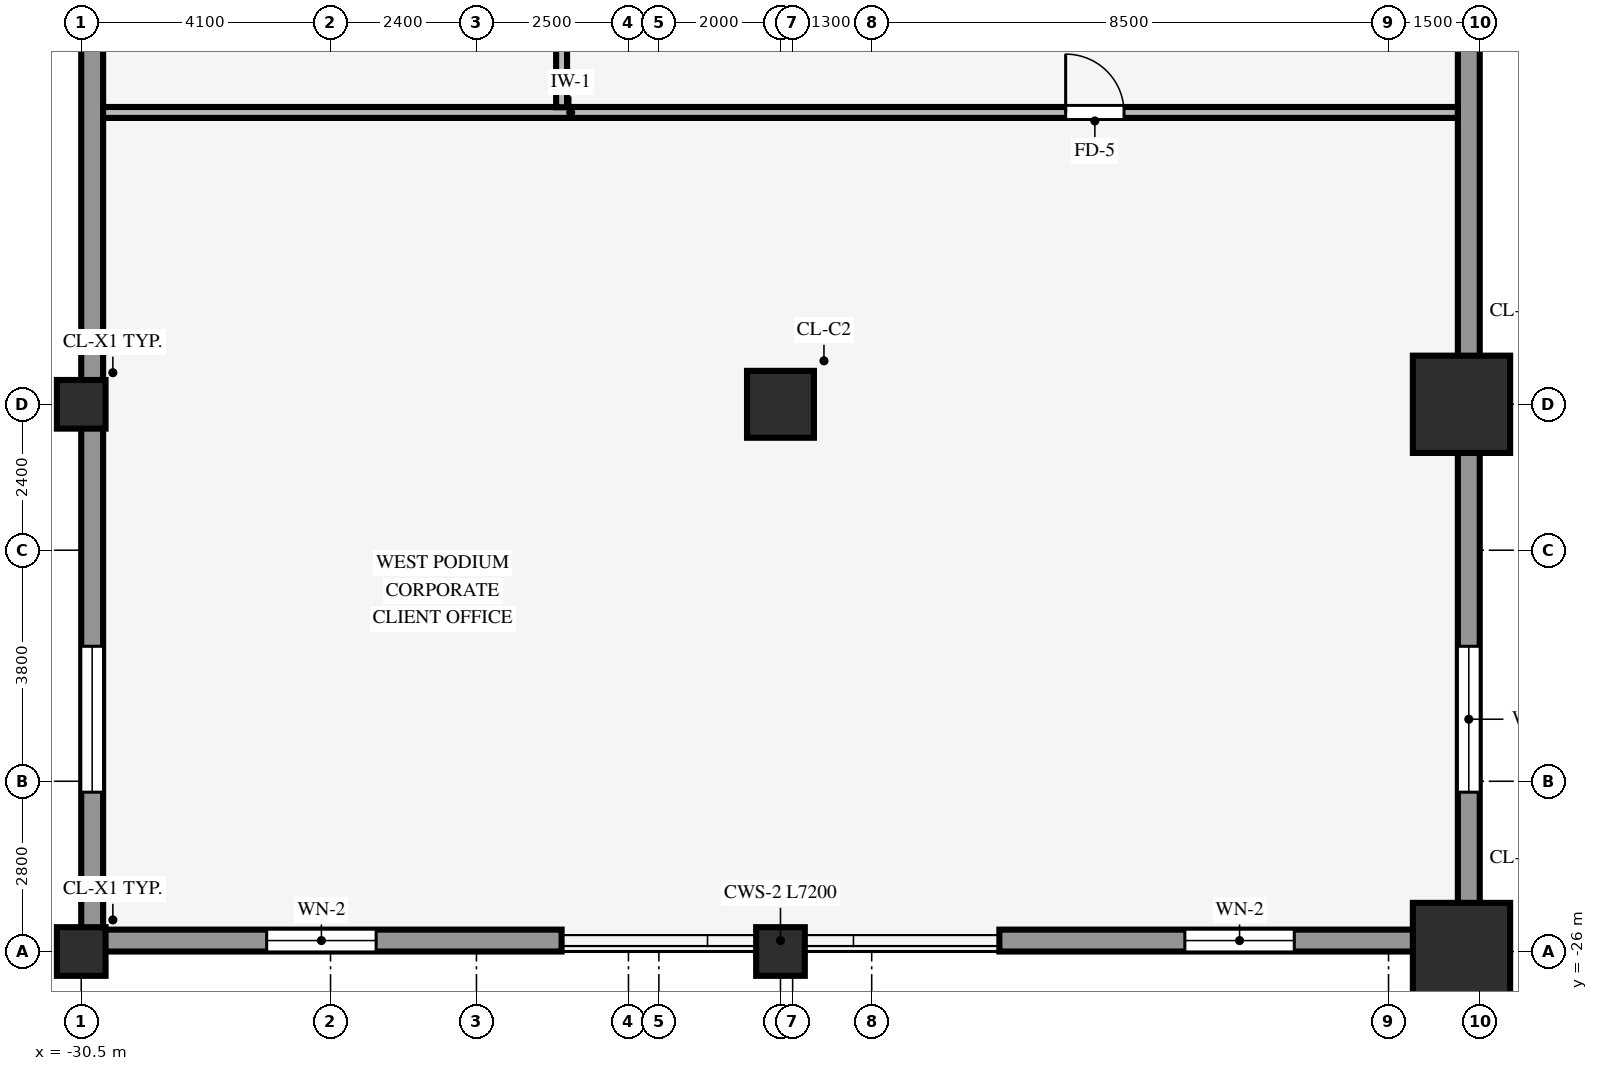
"""IFC4 building model, lengths in metres.
Left out: names, types, materials, properties, quantities, classifications, styles, units other than length and angle.
Written with IfcOpenShell. Run it as: python <this file> out.ifc"""

import sys

from ifc_helpers import new_model, si_unit, direction, frame, frame_2d, origin, origin_2d, place, context, subcontext, project, spatial, rectangle, hollow_rectangle, extrude, source, transform, mapped, element, fill, save


model = new_model("IFC4")
c1 = context("Model", 3, precision=1e-05, world=origin(), true_north=direction((0.0, 1.0)))
c2 = subcontext(c1, "Body", "Model", "MODEL_VIEW")
j1 = project(units=[si_unit("LENGTHUNIT", "METRE"), si_unit("PLANEANGLEUNIT", "RADIAN")], contexts=[c1])
p1 = place(None, origin())
s1 = spatial("IfcSite", under=j1, at=p1, CompositionType="ELEMENT")
p2 = place(p1, origin())
s2 = spatial("IfcBuilding", under=s1, at=p2, CompositionType="ELEMENT")
p3 = place(p2, frame((0.0, 0.0, 9.2)))
s3 = spatial("IfcBuildingStorey", under=s2, at=p3, CompositionType="ELEMENT", Elevation=9.2)
for number, where, z_axis, x_axis in (
    (1, (-7.8, -26.0, 0.0), (0.0, 0.0, 1.0), (1.0, 0.0, 0.0)),
    (2, (-7.8, -17.0, 0.0), (0.0, 0.0, 1.0), (1.0, 0.0, 0.0)),
):
    element("IfcColumn", number, at=place(p3, frame(where, z_axis=z_axis, x_axis=x_axis)), inside=s3, PredefinedType="COLUMN", context=c2, shape_type="SweptSolid", body=[
        extrude(rectangle(XDim=1.6, YDim=1.6, at=origin_2d()), origin(), (0.0, 0.0, 1.0), 4.28),
    ])
for number, where, z_axis, x_axis in (
    (3, (-30.5, -26.0, 0.0), (0.0, 0.0, 1.0), (1.0, 0.0, 0.0)),
    (4, (-30.5, -17.0, 0.0), (0.0, 0.0, 1.0), (1.0, 0.0, 0.0)),
    (5, (-19.0, -26.0, 0.0), (0.0, 0.0, 1.0), (1.0, 0.0, 0.0)),
):
    element("IfcColumn", number, at=place(p3, frame(where, z_axis=z_axis, x_axis=x_axis)), inside=s3, PredefinedType="COLUMN", context=c2, shape_type="SweptSolid", body=[
        extrude(hollow_rectangle(XDim=0.8, YDim=0.8, WallThickness=0.055, InnerFilletRadius=0.055, OuterFilletRadius=0.11, at=origin_2d()), origin(), (0.0, 0.0, 1.0), 4.28),
    ])
p4 = place(p3, frame((-19.0, -17.0, 0.0), z_axis=(0.0, 0.0, 1.0), x_axis=(1.0, 0.0, 0.0)))
e6 = element("IfcColumn", 6, at=p4, inside=s3, PredefinedType="COLUMN", context=c2, shape_type="SweptSolid", body=[
    extrude(rectangle(XDim=1.1, YDim=1.1, at=origin_2d()), origin(), (0.0, 0.0, 1.0), 4.28),
])
p5 = place(p3, frame((-30.5, -25.82, 0.0), z_axis=(0.0, 0.0, 1.0), x_axis=(1.0, 0.0, 0.0)))
e7 = element("IfcWall", 7, at=p5, inside=s3, PredefinedType="STANDARD", context=c2, shape_type="SweptSolid", body=[
    extrude(rectangle(XDim=7.9, YDim=0.36, at=frame_2d((3.95, 0.0))), origin(), (0.0, 0.0, 1.0), 3.615),
])
p6 = place(p5, frame((3.05, 0.0, 0.85)))
e8 = element("IfcOpeningElement", 8, at=p6, cuts=e7, PredefinedType="OPENING", context=c2, shape_type="SweptSolid", body=[
    extrude(rectangle(XDim=1.8, YDim=2.35, at=frame_2d((0.9, 1.175))), frame((0.0, 0.19, 0.0), z_axis=(0.0, -1.0, 0.0), x_axis=(1.0, 0.0, 0.0)), (0.0, 0.0, 1.0), 0.38),
])
p7 = place(p3, frame((-15.4, -25.82, 0.0), z_axis=(0.0, 0.0, 1.0), x_axis=(1.0, 0.0, 0.0)))
e9 = element("IfcWall", 9, at=p7, inside=s3, PredefinedType="STANDARD", context=c2, shape_type="SweptSolid", body=[
    extrude(rectangle(XDim=7.9, YDim=0.36, at=frame_2d((3.95, 0.0))), origin(), (0.0, 0.0, 1.0), 3.615),
])
p8 = place(p7, frame((3.05, 0.0, 0.85)))
e10 = element("IfcOpeningElement", 10, at=p8, cuts=e9, PredefinedType="OPENING", context=c2, shape_type="SweptSolid", body=[
    extrude(rectangle(XDim=1.8, YDim=2.35, at=frame_2d((0.9, 1.175))), frame((0.0, 0.19, 0.0), z_axis=(0.0, -1.0, 0.0), x_axis=(1.0, 0.0, 0.0)), (0.0, 0.0, 1.0), 0.38),
])
p9 = place(p3, frame((-7.68, -25.644, 0.0), z_axis=(0.0, 0.0, 1.0), x_axis=(0.0, 1.0, 0.0)))
e11 = element("IfcWall", 11, at=p9, inside=s3, PredefinedType="STANDARD", context=c2, shape_type="SweptSolid", body=[
    extrude(rectangle(XDim=51.288, YDim=0.36, at=frame_2d((25.644, 0.0))), origin(), (0.0, 0.0, 1.0), 3.649),
])
p10 = place(p9, frame((2.264, 0.0, 0.85)))
e12 = element("IfcOpeningElement", 12, at=p10, cuts=e11, PredefinedType="OPENING", context=c2, shape_type="SweptSolid", body=[
    extrude(rectangle(XDim=2.4, YDim=2.45, at=frame_2d((1.2, 1.225))), frame((0.0, 0.19, 0.0), z_axis=(0.0, -1.0, 0.0), x_axis=(1.0, 0.0, 0.0)), (0.0, 0.0, 1.0), 0.38),
])
p11 = place(p9, frame((17.051, 0.0, 0.85)))
e13 = element("IfcOpeningElement", 13, at=p11, cuts=e11, PredefinedType="OPENING", context=c2, shape_type="SweptSolid", body=[
    extrude(rectangle(XDim=2.4, YDim=2.45, at=frame_2d((1.2, 1.225))), frame((0.0, 0.19, 0.0), z_axis=(0.0, -1.0, 0.0), x_axis=(1.0, 0.0, 0.0)), (0.0, 0.0, 1.0), 0.38),
])
p12 = place(p9, frame((21.979, 0.0, 0.85)))
e14 = element("IfcOpeningElement", 14, at=p12, cuts=e11, PredefinedType="OPENING", context=c2, shape_type="SweptSolid", body=[
    extrude(rectangle(XDim=2.4, YDim=2.45, at=frame_2d((1.2, 1.225))), frame((0.0, 0.19, 0.0), z_axis=(0.0, -1.0, 0.0), x_axis=(1.0, 0.0, 0.0)), (0.0, 0.0, 1.0), 0.38),
])
p13 = place(p9, frame((26.908, 0.0, 0.85)))
e15 = element("IfcOpeningElement", 15, at=p13, cuts=e11, PredefinedType="OPENING", context=c2, shape_type="SweptSolid", body=[
    extrude(rectangle(XDim=2.4, YDim=2.45, at=frame_2d((1.2, 1.225))), frame((0.0, 0.19, 0.0), z_axis=(0.0, -1.0, 0.0), x_axis=(1.0, 0.0, 0.0)), (0.0, 0.0, 1.0), 0.38),
])
p14 = place(p9, frame((31.837, 0.0, 0.85)))
e16 = element("IfcOpeningElement", 16, at=p14, cuts=e11, PredefinedType="OPENING", context=c2, shape_type="SweptSolid", body=[
    extrude(rectangle(XDim=2.4, YDim=2.45, at=frame_2d((1.2, 1.225))), frame((0.0, 0.19, 0.0), z_axis=(0.0, -1.0, 0.0), x_axis=(1.0, 0.0, 0.0)), (0.0, 0.0, 1.0), 0.38),
])
p15 = place(p9, frame((46.624, 0.0, 0.85)))
e17 = element("IfcOpeningElement", 17, at=p15, cuts=e11, PredefinedType="OPENING", context=c2, shape_type="SweptSolid", body=[
    extrude(rectangle(XDim=2.4, YDim=2.45, at=frame_2d((1.2, 1.225))), frame((0.0, 0.19, 0.0), z_axis=(0.0, -1.0, 0.0), x_axis=(1.0, 0.0, 0.0)), (0.0, 0.0, 1.0), 0.38),
])
p16 = place(p3, frame((-30.32, -25.644, 0.0), z_axis=(0.0, 0.0, 1.0), x_axis=(0.0, 1.0, 0.0)))
e18 = element("IfcWall", 18, at=p16, inside=s3, PredefinedType="STANDARD", context=c2, shape_type="SweptSolid", body=[
    extrude(rectangle(XDim=51.288, YDim=0.36, at=frame_2d((25.644, 0.0))), origin(), (0.0, 0.0, 1.0), 3.615),
])
p17 = place(p16, frame((2.264, 0.0, 0.85)))
e19 = element("IfcOpeningElement", 19, at=p17, cuts=e18, PredefinedType="OPENING", context=c2, shape_type="SweptSolid", body=[
    extrude(rectangle(XDim=2.4, YDim=2.45, at=frame_2d((1.2, 1.225))), frame((0.0, 0.19, 0.0), z_axis=(0.0, -1.0, 0.0), x_axis=(1.0, 0.0, 0.0)), (0.0, 0.0, 1.0), 0.38),
])
p18 = place(p16, frame((17.051, 0.0, 0.85)))
e20 = element("IfcOpeningElement", 20, at=p18, cuts=e18, PredefinedType="OPENING", context=c2, shape_type="SweptSolid", body=[
    extrude(rectangle(XDim=2.4, YDim=2.45, at=frame_2d((1.2, 1.225))), frame((0.0, 0.19, 0.0), z_axis=(0.0, -1.0, 0.0), x_axis=(1.0, 0.0, 0.0)), (0.0, 0.0, 1.0), 0.38),
])
p19 = place(p16, frame((21.979, 0.0, 0.85)))
e21 = element("IfcOpeningElement", 21, at=p19, cuts=e18, PredefinedType="OPENING", context=c2, shape_type="SweptSolid", body=[
    extrude(rectangle(XDim=2.4, YDim=2.45, at=frame_2d((1.2, 1.225))), frame((0.0, 0.19, 0.0), z_axis=(0.0, -1.0, 0.0), x_axis=(1.0, 0.0, 0.0)), (0.0, 0.0, 1.0), 0.38),
])
p20 = place(p16, frame((26.908, 0.0, 0.85)))
e22 = element("IfcOpeningElement", 22, at=p20, cuts=e18, PredefinedType="OPENING", context=c2, shape_type="SweptSolid", body=[
    extrude(rectangle(XDim=2.4, YDim=2.45, at=frame_2d((1.2, 1.225))), frame((0.0, 0.19, 0.0), z_axis=(0.0, -1.0, 0.0), x_axis=(1.0, 0.0, 0.0)), (0.0, 0.0, 1.0), 0.38),
])
p21 = place(p16, frame((31.837, 0.0, 0.85)))
e23 = element("IfcOpeningElement", 23, at=p21, cuts=e18, PredefinedType="OPENING", context=c2, shape_type="SweptSolid", body=[
    extrude(rectangle(XDim=2.4, YDim=2.45, at=frame_2d((1.2, 1.225))), frame((0.0, 0.19, 0.0), z_axis=(0.0, -1.0, 0.0), x_axis=(1.0, 0.0, 0.0)), (0.0, 0.0, 1.0), 0.38),
])
p22 = place(p16, frame((46.624, 0.0, 0.85)))
e24 = element("IfcOpeningElement", 24, at=p22, cuts=e18, PredefinedType="OPENING", context=c2, shape_type="SweptSolid", body=[
    extrude(rectangle(XDim=2.4, YDim=2.45, at=frame_2d((1.2, 1.225))), frame((0.0, 0.19, 0.0), z_axis=(0.0, -1.0, 0.0), x_axis=(1.0, 0.0, 0.0)), (0.0, 0.0, 1.0), 0.38),
])
p23 = place(p3, frame((-30.14, -12.2, 0.0), z_axis=(0.0, 0.0, 1.0), x_axis=(1.0, 0.0, 0.0)))
e25 = element("IfcWall", 25, at=p23, inside=s3, PredefinedType="PARTITIONING", context=c2, shape_type="SweptSolid", body=[
    extrude(rectangle(XDim=22.28, YDim=0.18, at=frame_2d((11.14, 0.0))), origin(), (0.0, 0.0, 1.0), 4.27),
])
p24 = place(p23, frame((15.83, 0.0, 0.0)))
e26 = element("IfcOpeningElement", 26, at=p24, cuts=e25, PredefinedType="OPENING", context=c2, shape_type="SweptSolid", body=[
    extrude(rectangle(XDim=0.96, YDim=2.1, at=frame_2d((0.48, 1.05))), frame((0.0, 0.1, 0.0), z_axis=(0.0, -1.0, 0.0), x_axis=(1.0, 0.0, 0.0)), (0.0, 0.0, 1.0), 0.2),
])
p25 = place(p3, frame((-22.6, -12.114, 0.0), z_axis=(0.0, 0.0, 1.0), x_axis=(0.0, 1.0, 0.0)))
e27 = element("IfcWall", 27, at=p25, inside=s3, PredefinedType="PARTITIONING", context=c2, shape_type="SweptSolid", body=[
    extrude(rectangle(XDim=37.919, YDim=0.18, at=frame_2d((18.959, 0.0))), origin(), (0.0, 0.0, 1.0), 4.27),
])
p26 = place(p25, frame((11.634, 0.0, 0.0)))
e28 = element("IfcOpeningElement", 28, at=p26, cuts=e27, PredefinedType="OPENING", context=c2, shape_type="SweptSolid", body=[
    extrude(rectangle(XDim=0.96, YDim=2.1, at=frame_2d((0.48, 1.05))), frame((0.0, 0.1, 0.0), z_axis=(0.0, -1.0, 0.0), x_axis=(1.0, 0.0, 0.0)), (0.0, 0.0, 1.0), 0.2),
])
p27 = place(p25, frame((29.534, 0.0, 0.0)))
e29 = element("IfcOpeningElement", 29, at=p27, cuts=e27, PredefinedType="OPENING", context=c2, shape_type="SweptSolid", body=[
    extrude(rectangle(XDim=0.96, YDim=2.1, at=frame_2d((0.48, 1.05))), frame((0.0, 0.1, 0.0), z_axis=(0.0, -1.0, 0.0), x_axis=(1.0, 0.0, 0.0)), (0.0, 0.0, 1.0), 0.2),
])
m1 = source(origin(), c2, "Body", "SweptSolid", [
    extrude(rectangle(XDim=1.8, YDim=2.35, at=frame_2d((0.9, 1.175))), frame((0.0, 0.03, 0.0), z_axis=(0.0, -1.0, 0.0), x_axis=(1.0, 0.0, 0.0)), (0.0, 0.0, 1.0), 0.06),
])
p28 = place(p6, origin())
e30 = element("IfcWindow", 30, at=p28, inside=s3, PartitioningType="SINGLE_PANEL", PredefinedType="WINDOW", context=c2, shape_type="MappedRepresentation", body=[
    mapped(m1, transform((0.0, 0.0, 0.0), scale=1.0)),
])
fill(e8, e30)
p29 = place(p8, origin())
e31 = element("IfcWindow", 31, at=p29, inside=s3, PartitioningType="SINGLE_PANEL", PredefinedType="WINDOW", context=c2, shape_type="MappedRepresentation", body=[
    mapped(m1, transform((0.0, 0.0, 0.0), scale=1.0)),
])
fill(e10, e31)
m2 = source(origin(), c2, "Body", "SweptSolid", [
    extrude(rectangle(XDim=2.4, YDim=2.45, at=frame_2d((1.2, 1.225))), frame((0.0, 0.03, 0.0), z_axis=(0.0, -1.0, 0.0), x_axis=(1.0, 0.0, 0.0)), (0.0, 0.0, 1.0), 0.06),
])
p30 = place(p10, origin())
e32 = element("IfcWindow", 32, at=p30, inside=s3, PartitioningType="SINGLE_PANEL", PredefinedType="WINDOW", context=c2, shape_type="MappedRepresentation", body=[
    mapped(m2, transform((0.0, 0.0, 0.0), scale=1.0)),
])
fill(e12, e32)
p31 = place(p17, origin())
e33 = element("IfcWindow", 33, at=p31, inside=s3, PartitioningType="SINGLE_PANEL", PredefinedType="WINDOW", context=c2, shape_type="MappedRepresentation", body=[
    mapped(m2, transform((0.0, 0.0, 0.0), scale=1.0)),
])
fill(e19, e33)
m3 = source(origin(), c2, "Body", "SweptSolid", [
    extrude(rectangle(XDim=0.96, YDim=2.1, at=frame_2d((0.48, 1.05))), frame((0.0, 0.025, 0.0), z_axis=(0.0, -1.0, 0.0), x_axis=(1.0, 0.0, 0.0)), (0.0, 0.0, 1.0), 0.05),
])
p32 = place(p24, origin())
e34 = element("IfcDoor", 34, at=p32, inside=s3, OperationType="SINGLE_SWING_LEFT", PredefinedType="DOOR", context=c2, shape_type="MappedRepresentation", body=[
    mapped(m3, transform((0.0, 0.0, 0.0), scale=1.0)),
])
fill(e26, e34)
save(model, sys.argv[1])
